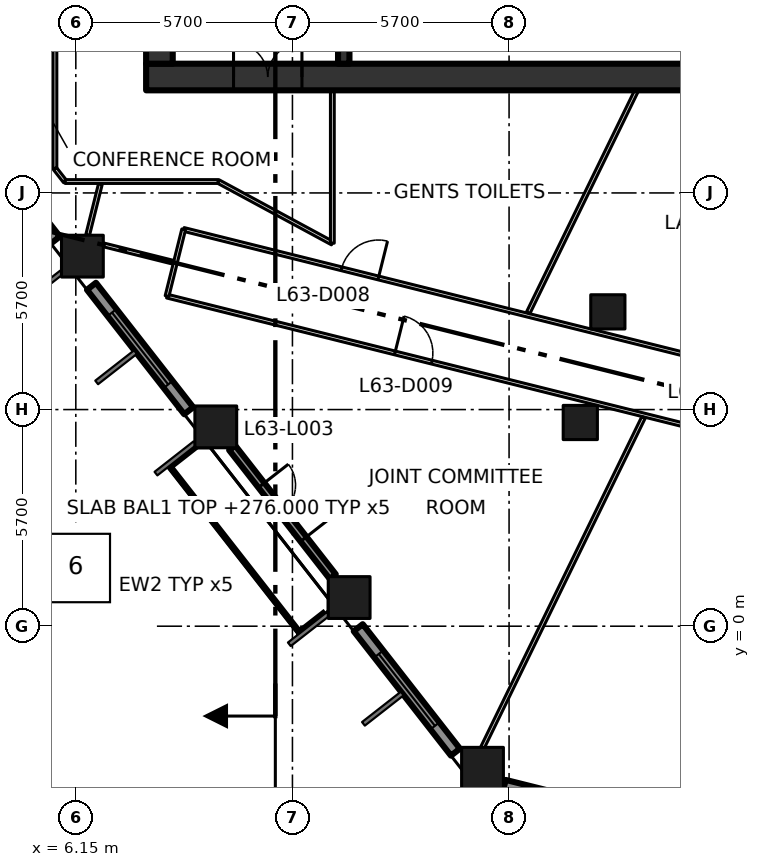
"""IFC4 building model, lengths in metres.
Left out: names, types, materials, properties, quantities, classifications, styles, units other than length and angle.
Written with IfcOpenShell. Run it as: python <this file> out.ifc"""

import sys

from ifc_helpers import new_model, si_unit, direction, frame, frame_2d, origin, origin_2d, place, context, subcontext, project, spatial, rectangle, extrude, element, fill, save


model = new_model("IFC4")
c1 = context("Model", 3, precision=1e-05, world=origin(), true_north=direction((0.0, 1.0)))
c2 = subcontext(c1, "Body", "Model", "MODEL_VIEW")
j1 = project(units=[si_unit("LENGTHUNIT", "METRE"), si_unit("PLANEANGLEUNIT", "RADIAN")], contexts=[c1])
p1 = place(None, origin())
s1 = spatial("IfcSite", under=j1, at=p1, CompositionType="ELEMENT")
p2 = place(p1, origin())
s2 = spatial("IfcBuilding", under=s1, at=p2, CompositionType="ELEMENT")
p3 = place(p2, frame((0.0, 0.0, 276.0)))
s3 = spatial("IfcBuildingStorey", under=s2, at=p3, CompositionType="ELEMENT", Elevation=276.0)
for number, where, z_axis, x_axis in (
    (1, (16.851, -3.738, 0.0), (0.0, 0.0, 1.0), (1.0, 0.0, 0.0)),
    (2, (13.342, 0.754, 0.0), (0.0, 0.0, 1.0), (1.0, 0.0, 0.0)),
    (3, (9.833, 5.245, 0.0), (0.0, 0.0, 1.0), (1.0, 0.0, 0.0)),
    (4, (6.323, 9.737, 0.0), (0.0, 0.0, 1.0), (1.0, 0.0, 0.0)),
):
    element("IfcColumn", number, at=place(p3, frame(where, z_axis=z_axis, x_axis=x_axis)), inside=s3, PredefinedType="COLUMN", context=c2, shape_type="SweptSolid", body=[
        extrude(rectangle(XDim=1.1, YDim=1.1, at=origin_2d()), origin(), (0.0, 0.0, 1.0), 4.2),
    ])
for number, where, z_axis, x_axis in (
    (5, (19.424, 5.36, 0.0), (0.0, 0.0, 1.0), (1.0, 0.0, 0.0)),
    (6, (20.149, 8.271, 0.0), (0.0, 0.0, 1.0), (1.0, 0.0, 0.0)),
):
    element("IfcColumn", number, at=place(p3, frame(where, z_axis=z_axis, x_axis=x_axis)), inside=s3, PredefinedType="COLUMN", context=c2, shape_type="SweptSolid", body=[
        extrude(rectangle(XDim=0.9, YDim=0.9, at=origin_2d()), origin(), (0.0, 0.0, 1.0), 4.2),
    ])
p4 = place(p3, frame((8.0, 14.45, -0.3), z_axis=(0.0, 0.0, 1.0), x_axis=(1.0, 0.0, 0.0)))
e7 = element("IfcWall", 7, at=p4, inside=s3, PredefinedType="SHEAR", context=c2, shape_type="SweptSolid", body=[
    extrude(rectangle(XDim=22.8, YDim=0.7, at=frame_2d((11.4, 0.0))), origin(), (0.0, 0.0, 1.0), 4.2),
])
p5 = place(p4, frame((2.3, 0.0, 0.3)))
e8 = element("IfcOpeningElement", 8, at=p5, cuts=e7, PredefinedType="OPENING", context=c2, shape_type="SweptSolid", body=[
    extrude(rectangle(XDim=1.8, YDim=2.1, at=frame_2d((0.9, 1.05))), frame((0.0, 0.36, 0.0), z_axis=(0.0, -1.0, 0.0), x_axis=(1.0, 0.0, 0.0)), (0.0, 0.0, 1.0), 0.72),
])
p6 = place(p3, frame((8.35, 14.8, -0.3), z_axis=(0.0, 0.0, 1.0), x_axis=(0.0, 1.0, 0.0)))
e9 = element("IfcWall", 9, at=p6, inside=s3, PredefinedType="SHEAR", context=c2, shape_type="SweptSolid", body=[
    extrude(rectangle(XDim=20.9, YDim=0.7, at=frame_2d((10.45, 0.0))), origin(), (0.0, 0.0, 1.0), 4.2),
])
p7 = place(p3, frame((13.2, 14.8, 0.0), z_axis=(0.0, 0.0, 1.0), x_axis=(0.0, 1.0, 0.0)))
e10 = element("IfcWall", 10, at=p7, inside=s3, PredefinedType="SHEAR", context=c2, shape_type="SweptSolid", body=[
    extrude(rectangle(XDim=20.9, YDim=0.3, at=frame_2d((10.45, 0.0))), origin(), (0.0, 0.0, 1.0), 3.9),
])
p8 = place(p7, frame((3.5, 0.0, 0.0)))
e11 = element("IfcOpeningElement", 11, at=p8, cuts=e10, PredefinedType="OPENING", context=c2, shape_type="SweptSolid", body=[
    extrude(rectangle(XDim=1.8, YDim=2.1, at=frame_2d((0.9, 1.05))), frame((0.0, 0.16, 0.0), z_axis=(0.0, -1.0, 0.0), x_axis=(1.0, 0.0, 0.0)), (0.0, 0.0, 1.0), 0.32),
])
p9 = place(p7, frame((11.6, 0.0, 0.0)))
e12 = element("IfcOpeningElement", 12, at=p9, cuts=e10, PredefinedType="OPENING", context=c2, shape_type="SweptSolid", body=[
    extrude(rectangle(XDim=1.2, YDim=2.1, at=frame_2d((0.6, 1.05))), frame((0.0, 0.16, 0.0), z_axis=(0.0, -1.0, 0.0), x_axis=(1.0, 0.0, 0.0)), (0.0, 0.0, 1.0), 0.32),
])
p10 = place(p3, frame((3.053, 13.436, 0.0), z_axis=(0.0, 0.0, 1.0), x_axis=(0.615699893917, -0.787980736205, 0.0)))
e13 = element("IfcWall", 13, at=p10, inside=s3, PredefinedType="SOLIDWALL", context=c2, shape_type="SweptSolid", body=[
    extrude(rectangle(XDim=4.156, YDim=0.3, at=frame_2d((2.078, 0.0))), origin(), (0.0, 0.0, 1.0), 3.15),
])
p11 = place(p10, frame((0.878, 0.0, 0.8)))
e14 = element("IfcOpeningElement", 14, at=p11, cuts=e13, PredefinedType="OPENING", context=c2, shape_type="SweptSolid", body=[
    extrude(rectangle(XDim=2.4, YDim=2.1, at=frame_2d((1.2, 1.05))), frame((0.0, 0.16, 0.0), z_axis=(0.0, -1.0, 0.0), x_axis=(1.0, 0.0, 0.0)), (0.0, 0.0, 1.0), 0.32),
])
p12 = place(p3, frame((6.562, 8.944, 0.0), z_axis=(0.0, 0.0, 1.0), x_axis=(0.615699893917, -0.787980736205, 0.0)))
e15 = element("IfcWall", 15, at=p12, inside=s3, PredefinedType="SOLIDWALL", context=c2, shape_type="SweptSolid", body=[
    extrude(rectangle(XDim=4.156, YDim=0.3, at=frame_2d((2.078, 0.0))), origin(), (0.0, 0.0, 1.0), 3.15),
])
p13 = place(p12, frame((0.878, 0.0, 0.8)))
e16 = element("IfcOpeningElement", 16, at=p13, cuts=e15, PredefinedType="OPENING", context=c2, shape_type="SweptSolid", body=[
    extrude(rectangle(XDim=2.4, YDim=2.1, at=frame_2d((1.2, 1.05))), frame((0.0, 0.16, 0.0), z_axis=(0.0, -1.0, 0.0), x_axis=(1.0, 0.0, 0.0)), (0.0, 0.0, 1.0), 0.32),
])
p14 = place(p3, frame((10.263, 4.695, 0.0), z_axis=(0.0, 0.0, 1.0), x_axis=(0.615624224328, -0.788039855858, 0.0)))
e17 = element("IfcWall", 17, at=p14, inside=s3, PredefinedType="SOLIDWALL", context=c2, shape_type="SweptSolid", body=[
    extrude(rectangle(XDim=4.303, YDim=0.2, at=frame_2d((2.152, 0.0))), origin(), (0.0, 0.0, 1.0), 3.15),
])
p15 = place(p14, frame((1.251, 0.0, 0.0)))
e18 = element("IfcOpeningElement", 18, at=p15, cuts=e17, PredefinedType="OPENING", context=c2, shape_type="SweptSolid", body=[
    extrude(rectangle(XDim=1.8, YDim=2.9, at=frame_2d((0.9, 1.45))), frame((0.0, 0.11, 0.0), z_axis=(0.0, -1.0, 0.0), x_axis=(1.0, 0.0, 0.0)), (0.0, 0.0, 1.0), 0.22),
])
p16 = place(p3, frame((8.89, 4.292, 0.0), z_axis=(0.0, 0.0, 1.0), x_axis=(0.615636085037, -0.788030590016, 0.0)))
e19 = element("IfcWall", 19, at=p16, inside=s3, PredefinedType="SOLIDWALL", context=c2, shape_type="SweptSolid", body=[
    extrude(rectangle(XDim=5.359, YDim=0.4, at=frame_2d((2.679, 0.0))), origin(), (0.0, 0.0, 1.0), 0.3),
])
p17 = place(p3, frame((13.581, -0.039, 0.0), z_axis=(0.0, 0.0, 1.0), x_axis=(0.615545986363, -0.788100969846, 0.0)))
e20 = element("IfcWall", 20, at=p17, inside=s3, PredefinedType="SOLIDWALL", context=c2, shape_type="SweptSolid", body=[
    extrude(rectangle(XDim=4.156, YDim=0.3, at=frame_2d((2.078, 0.0))), origin(), (0.0, 0.0, 1.0), 3.15),
])
p18 = place(p17, frame((0.878, 0.0, 0.8)))
e21 = element("IfcOpeningElement", 21, at=p18, cuts=e20, PredefinedType="OPENING", context=c2, shape_type="SweptSolid", body=[
    extrude(rectangle(XDim=2.4, YDim=2.1, at=frame_2d((1.2, 1.05))), frame((0.0, 0.16, 0.0), z_axis=(0.0, -1.0, 0.0), x_axis=(1.0, 0.0, 0.0)), (0.0, 0.0, 1.0), 0.32),
])
p19 = place(p3, frame((17.425, -4.19, 0.0), z_axis=(0.0, 0.0, 1.0), x_axis=(0.970270592847, -0.242022677978, 0.0)))
e22 = element("IfcWall", 22, at=p19, inside=s3, PredefinedType="SOLIDWALL", context=c2, shape_type="SweptSolid", body=[
    extrude(rectangle(XDim=4.368, YDim=0.3, at=frame_2d((2.184, 0.0))), origin(), (0.0, 0.0, 1.0), 3.15),
])
p20 = place(p19, frame((0.983, 0.0, 0.8)))
e23 = element("IfcOpeningElement", 23, at=p20, cuts=e22, PredefinedType="OPENING", context=c2, shape_type="SweptSolid", body=[
    extrude(rectangle(XDim=2.4, YDim=2.1, at=frame_2d((1.2, 1.05))), frame((0.0, 0.16, 0.0), z_axis=(0.0, -1.0, 0.0), x_axis=(1.0, 0.0, 0.0)), (0.0, 0.0, 1.0), 0.32),
])
p21 = place(p3, frame((5.6, 12.043, 0.0), z_axis=(0.0, 0.0, 1.0), x_axis=(0.0, 1.0, 0.0)))
e24 = element("IfcWall", 24, at=p21, inside=s3, PredefinedType="PARTITIONING", context=c2, shape_type="SweptSolid", body=[
    extrude(rectangle(XDim=27.257, YDim=0.1, at=frame_2d((13.628, 0.0))), origin(), (0.0, 0.0, 1.0), 3.9),
])
p22 = place(p21, frame((4.78, 0.0, 0.0)))
e25 = element("IfcOpeningElement", 25, at=p22, cuts=e24, PredefinedType="OPENING", context=c2, shape_type="SweptSolid", body=[
    extrude(rectangle(XDim=1.0, YDim=2.1, at=frame_2d((0.5, 1.05))), frame((0.0, 0.06, 0.0), z_axis=(0.0, -1.0, 0.0), x_axis=(1.0, 0.0, 0.0)), (0.0, 0.0, 1.0), 0.12),
])
p23 = place(p21, frame((13.768, 0.0, 0.0)))
e26 = element("IfcOpeningElement", 26, at=p23, cuts=e24, PredefinedType="OPENING", context=c2, shape_type="SweptSolid", body=[
    extrude(rectangle(XDim=1.0, YDim=2.1, at=frame_2d((0.5, 1.05))), frame((0.0, 0.06, 0.0), z_axis=(0.0, -1.0, 0.0), x_axis=(1.0, 0.0, 0.0)), (0.0, 0.0, 1.0), 0.12),
])
p24 = place(p21, frame((19.368, 0.0, 0.0)))
e27 = element("IfcOpeningElement", 27, at=p24, cuts=e24, PredefinedType="OPENING", context=c2, shape_type="SweptSolid", body=[
    extrude(rectangle(XDim=1.0, YDim=2.1, at=frame_2d((0.5, 1.05))), frame((0.0, 0.06, 0.0), z_axis=(0.0, -1.0, 0.0), x_axis=(1.0, 0.0, 0.0)), (0.0, 0.0, 1.0), 0.12),
])
p25 = place(p21, frame((24.368, 0.0, 0.0)))
e28 = element("IfcOpeningElement", 28, at=p25, cuts=e24, PredefinedType="OPENING", context=c2, shape_type="SweptSolid", body=[
    extrude(rectangle(XDim=1.0, YDim=2.1, at=frame_2d((0.5, 1.05))), frame((0.0, 0.06, 0.0), z_axis=(0.0, -1.0, 0.0), x_axis=(1.0, 0.0, 0.0)), (0.0, 0.0, 1.0), 0.12),
])
p26 = place(p3, frame((5.6, 12.043, 0.0), z_axis=(0.0, 0.0, 1.0), x_axis=(0.615415398102, -0.788202948344, 0.0)))
e29 = element("IfcWall", 29, at=p26, inside=s3, PredefinedType="PARTITIONING", context=c2, shape_type="SweptSolid", body=[
    extrude(rectangle(XDim=0.435, YDim=0.1, at=frame_2d((0.218, 0.0))), origin(), (0.0, 0.0, 1.0), 3.9),
])
p27 = place(p3, frame((5.868, 11.7, 0.0), z_axis=(0.0, 0.0, 1.0), x_axis=(1.0, 0.0, 0.0)))
e30 = element("IfcWall", 30, at=p27, inside=s3, PredefinedType="PARTITIONING", context=c2, shape_type="SweptSolid", body=[
    extrude(rectangle(XDim=4.032, YDim=0.1, at=frame_2d((2.016, 0.0))), origin(), (0.0, 0.0, 1.0), 3.9),
])
p28 = place(p3, frame((8.55, 8.685, 0.0), z_axis=(0.0, 0.0, 1.0), x_axis=(0.970297101369, -0.241916380335, 0.0)))
e31 = element("IfcWall", 31, at=p28, inside=s3, PredefinedType="PARTITIONING", context=c2, shape_type="SweptSolid", body=[
    extrude(rectangle(XDim=51.675, YDim=0.1, at=frame_2d((25.837, 0.0))), origin(), (0.0, 0.0, 1.0), 3.9),
])
p29 = place(p28, frame((35.018, 0.0, 0.0)))
e32 = element("IfcOpeningElement", 32, at=p29, cuts=e31, PredefinedType="OPENING", context=c2, shape_type="SweptSolid", body=[
    extrude(rectangle(XDim=1.8, YDim=2.1, at=frame_2d((0.9, 1.05))), frame((0.0, 0.06, 0.0), z_axis=(0.0, -1.0, 0.0), x_axis=(1.0, 0.0, 0.0)), (0.0, 0.0, 1.0), 0.12),
])
p30 = place(p28, frame((19.518, 0.0, 0.0)))
e33 = element("IfcOpeningElement", 33, at=p30, cuts=e31, PredefinedType="OPENING", context=c2, shape_type="SweptSolid", body=[
    extrude(rectangle(XDim=1.8, YDim=2.1, at=frame_2d((0.9, 1.05))), frame((0.0, 0.06, 0.0), z_axis=(0.0, -1.0, 0.0), x_axis=(1.0, 0.0, 0.0)), (0.0, 0.0, 1.0), 0.12),
])
p31 = place(p28, frame((25.118, 0.0, 0.0)))
e34 = element("IfcOpeningElement", 34, at=p31, cuts=e31, PredefinedType="OPENING", context=c2, shape_type="SweptSolid", body=[
    extrude(rectangle(XDim=1.0, YDim=2.1, at=frame_2d((0.5, 1.05))), frame((0.0, 0.06, 0.0), z_axis=(0.0, -1.0, 0.0), x_axis=(1.0, 0.0, 0.0)), (0.0, 0.0, 1.0), 0.12),
])
p32 = place(p28, frame((6.18, 0.0, 0.0)))
e35 = element("IfcOpeningElement", 35, at=p32, cuts=e31, PredefinedType="OPENING", context=c2, shape_type="SweptSolid", body=[
    extrude(rectangle(XDim=1.0, YDim=2.1, at=frame_2d((0.5, 1.05))), frame((0.0, 0.06, 0.0), z_axis=(0.0, -1.0, 0.0), x_axis=(1.0, 0.0, 0.0)), (0.0, 0.0, 1.0), 0.12),
])
p33 = place(p3, frame((8.988, 10.44, 0.0), z_axis=(0.0, 0.0, 1.0), x_axis=(0.970301223092, -0.241899848006, 0.0)))
e36 = element("IfcWall", 36, at=p33, inside=s3, PredefinedType="PARTITIONING", context=c2, shape_type="SweptSolid", body=[
    extrude(rectangle(XDim=19.879, YDim=0.1, at=frame_2d((9.94, 0.0))), origin(), (0.0, 0.0, 1.0), 3.9),
])
p34 = place(p33, frame((4.28, 0.0, 0.0)))
e37 = element("IfcOpeningElement", 37, at=p34, cuts=e36, PredefinedType="OPENING", context=c2, shape_type="SweptSolid", body=[
    extrude(rectangle(XDim=1.0, YDim=2.1, at=frame_2d((0.5, 1.05))), frame((0.0, 0.06, 0.0), z_axis=(0.0, -1.0, 0.0), x_axis=(1.0, 0.0, 0.0)), (0.0, 0.0, 1.0), 0.12),
])
p35 = place(p33, frame((14.093, 0.0, 0.0)))
e38 = element("IfcOpeningElement", 38, at=p35, cuts=e36, PredefinedType="OPENING", context=c2, shape_type="SweptSolid", body=[
    extrude(rectangle(XDim=1.0, YDim=2.1, at=frame_2d((0.5, 1.05))), frame((0.0, 0.06, 0.0), z_axis=(0.0, -1.0, 0.0), x_axis=(1.0, 0.0, 0.0)), (0.0, 0.0, 1.0), 0.12),
])
p36 = place(p3, frame((8.988, 10.44, 0.0), z_axis=(0.0, 0.0, 1.0), x_axis=(-0.242154485745, -0.970237705428, 0.0)))
e39 = element("IfcWall", 39, at=p36, inside=s3, PredefinedType="PARTITIONING", context=c2, shape_type="SweptSolid", body=[
    extrude(rectangle(XDim=1.809, YDim=0.1, at=frame_2d((0.904, 0.0))), origin(), (0.0, 0.0, 1.0), 3.9),
])
p37 = place(p3, frame((9.9, 11.7, 0.0), z_axis=(0.0, 0.0, 1.0), x_axis=(0.87965147249, -0.475618846291, 0.0)))
e40 = element("IfcWall", 40, at=p37, inside=s3, PredefinedType="PARTITIONING", context=c2, shape_type="SweptSolid", body=[
    extrude(rectangle(XDim=3.41, YDim=0.1, at=frame_2d((1.705, 0.0))), origin(), (0.0, 0.0, 1.0), 3.9),
])
p38 = place(p3, frame((12.9, 10.078, 0.0), z_axis=(0.0, 0.0, 1.0), x_axis=(0.0, 1.0, 0.0)))
e41 = element("IfcWall", 41, at=p38, inside=s3, PredefinedType="PARTITIONING", context=c2, shape_type="SweptSolid", body=[
    extrude(rectangle(XDim=4.022, YDim=0.1, at=frame_2d((2.011, 0.0))), origin(), (0.0, 0.0, 1.0), 3.9),
])
p39 = place(p3, frame((6.797, 11.638, 0.0), z_axis=(0.0, 0.0, 1.0), x_axis=(-0.242164268782, -0.970235263699, 0.0)))
e42 = element("IfcWall", 42, at=p39, inside=s3, PredefinedType="PARTITIONING", context=c2, shape_type="SweptSolid", body=[
    extrude(rectangle(XDim=1.392, YDim=0.1, at=frame_2d((0.696, 0.0))), origin(), (0.0, 0.0, 1.0), 3.9),
])
p40 = place(p3, frame((8.72, 9.574, 0.0), z_axis=(0.0, 0.0, 1.0), x_axis=(-0.970240497311, 0.242143299263, 0.0)))
e43 = element("IfcWall", 43, at=p40, inside=s3, PredefinedType="PARTITIONING", context=c2, shape_type="SweptSolid", body=[
    extrude(rectangle(XDim=1.904, YDim=0.1, at=frame_2d((0.952, 0.0))), origin(), (0.0, 0.0, 1.0), 3.9),
])
p41 = place(p3, frame((16.853, -3.188, 0.0), z_axis=(0.0, 0.0, 1.0), x_axis=(0.43837932908, 0.898790055483, 0.0)))
e44 = element("IfcWall", 44, at=p41, inside=s3, PredefinedType="PARTITIONING", context=c2, shape_type="SweptSolid", body=[
    extrude(rectangle(XDim=9.663, YDim=0.1, at=frame_2d((4.832, 0.0))), origin(), (0.0, 0.0, 1.0), 3.9),
])
p42 = place(p3, frame((18.051, 8.242, 0.0), z_axis=(0.0, 0.0, 1.0), x_axis=(0.438336545362, 0.898810921719, 0.0)))
e45 = element("IfcWall", 45, at=p42, inside=s3, PredefinedType="PARTITIONING", context=c2, shape_type="SweptSolid", body=[
    extrude(rectangle(XDim=6.518, YDim=0.1, at=frame_2d((3.259, 0.0))), origin(), (0.0, 0.0, 1.0), 3.9),
])
p43 = place(p5, origin())
e46 = element("IfcDoor", 46, at=p43, inside=s3, OperationType="DOUBLE_DOOR_SINGLE_SWING", PredefinedType="DOOR", context=c2, shape_type="SweptSolid", body=[
    extrude(rectangle(XDim=1.8, YDim=2.1, at=frame_2d((0.9, 1.05))), frame((0.0, 0.025, 0.0), z_axis=(0.0, -1.0, 0.0), x_axis=(1.0, 0.0, 0.0)), (0.0, 0.0, 1.0), 0.05),
])
fill(e8, e46)
p44 = place(p13, origin())
e47 = element("IfcWindow", 47, at=p44, inside=s3, PartitioningType="DOUBLE_PANEL_VERTICAL", PredefinedType="WINDOW", context=c2, shape_type="SweptSolid", body=[
    extrude(rectangle(XDim=2.4, YDim=2.1, at=frame_2d((1.2, 1.05))), frame((0.0, 0.03, 0.0), z_axis=(0.0, -1.0, 0.0), x_axis=(1.0, 0.0, 0.0)), (0.0, 0.0, 1.0), 0.06),
])
fill(e16, e47)
p45 = place(p15, origin())
e48 = element("IfcDoor", 48, at=p45, inside=s3, OperationType="DOUBLE_DOOR_SINGLE_SWING", PredefinedType="DOOR", context=c2, shape_type="SweptSolid", body=[
    extrude(rectangle(XDim=1.8, YDim=2.9, at=frame_2d((0.9, 1.45))), frame((0.0, 0.025, 0.0), z_axis=(0.0, -1.0, 0.0), x_axis=(1.0, 0.0, 0.0)), (0.0, 0.0, 1.0), 0.05),
])
fill(e18, e48)
p46 = place(p18, origin())
e49 = element("IfcWindow", 49, at=p46, inside=s3, PartitioningType="DOUBLE_PANEL_VERTICAL", PredefinedType="WINDOW", context=c2, shape_type="SweptSolid", body=[
    extrude(rectangle(XDim=2.4, YDim=2.1, at=frame_2d((1.2, 1.05))), frame((0.0, 0.03, 0.0), z_axis=(0.0, -1.0, 0.0), x_axis=(1.0, 0.0, 0.0)), (0.0, 0.0, 1.0), 0.06),
])
fill(e21, e49)
p47 = place(p34, origin())
e50 = element("IfcDoor", 50, at=p47, inside=s3, OperationType="SINGLE_SWING_RIGHT", PredefinedType="DOOR", context=c2, shape_type="SweptSolid", body=[
    extrude(rectangle(XDim=1.0, YDim=2.1, at=frame_2d((0.5, 1.05))), frame((0.0, 0.025, 0.0), z_axis=(0.0, -1.0, 0.0), x_axis=(1.0, 0.0, 0.0)), (0.0, 0.0, 1.0), 0.05),
])
fill(e37, e50)
p48 = place(p32, origin())
e51 = element("IfcDoor", 51, at=p48, inside=s3, OperationType="SINGLE_SWING_LEFT", PredefinedType="DOOR", context=c2, shape_type="SweptSolid", body=[
    extrude(rectangle(XDim=1.0, YDim=2.1, at=frame_2d((0.5, 1.05))), frame((0.0, 0.025, 0.0), z_axis=(0.0, -1.0, 0.0), x_axis=(1.0, 0.0, 0.0)), (0.0, 0.0, 1.0), 0.05),
])
fill(e35, e51)
save(model, sys.argv[1])
